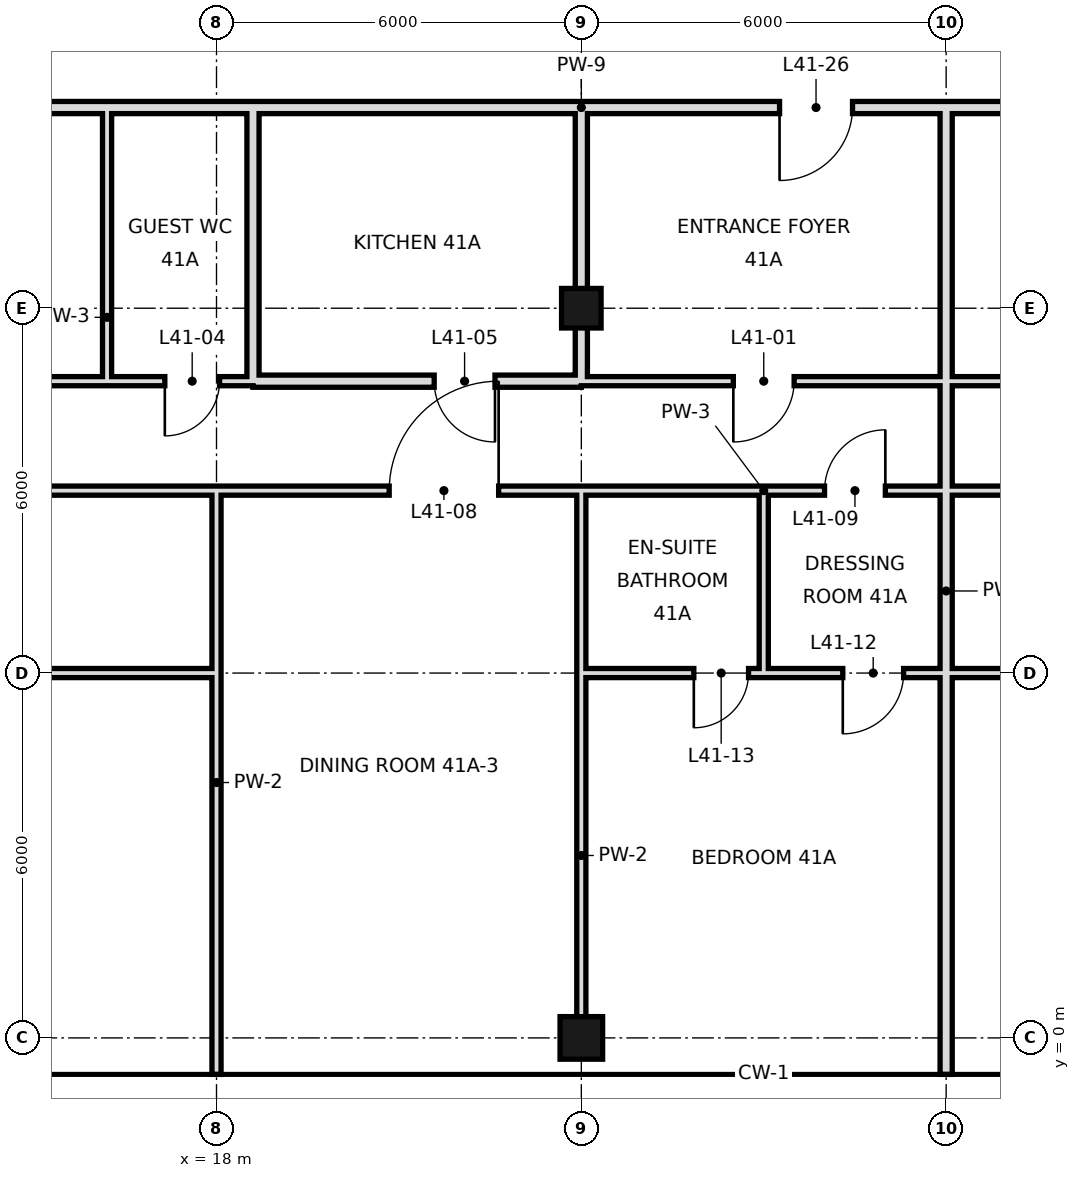
"""IFC4 building model, lengths in metres.
Left out: names, types, materials, properties, quantities, classifications, styles, units other than length and angle.
Written with IfcOpenShell. Run it as: python <this file> out.ifc"""

import sys

from ifc_helpers import new_model, si_unit, direction, frame, frame_2d, origin, origin_2d, place, context, subcontext, project, spatial, rectangle, hollow_rectangle, extrude, element, fill, save


model = new_model("IFC4")
c1 = context("Model", 3, precision=1e-05, world=origin(), true_north=direction((0.0, 1.0)))
c2 = subcontext(c1, "Body", "Model", "MODEL_VIEW")
j1 = project(units=[si_unit("LENGTHUNIT", "METRE"), si_unit("PLANEANGLEUNIT", "RADIAN")], contexts=[c1])
p1 = place(None, origin())
s1 = spatial("IfcSite", under=j1, at=p1, CompositionType="ELEMENT")
p2 = place(p1, origin())
s2 = spatial("IfcBuilding", under=s1, at=p2, CompositionType="ELEMENT")
p3 = place(p2, frame((0.0, 0.0, 178.0)))
s3 = spatial("IfcBuildingStorey", under=s2, at=p3, CompositionType="ELEMENT", Elevation=178.0)
p4 = place(p3, frame((24.0, 0.0, 0.0), z_axis=(0.0, 0.0, 1.0), x_axis=(1.0, 0.0, 0.0)))
e1 = element("IfcColumn", 1, at=p4, inside=s3, PredefinedType="COLUMN", context=c2, shape_type="SweptSolid", body=[
    extrude(hollow_rectangle(XDim=0.7, YDim=0.7, WallThickness=0.036, at=origin_2d()), origin(), (0.0, 0.0, 1.0), 3.6),
])
p5 = place(p3, frame((24.0, 12.0, 0.0), z_axis=(0.0, 0.0, 1.0), x_axis=(1.0, 0.0, 0.0)))
e2 = element("IfcColumn", 2, at=p5, inside=s3, PredefinedType="COLUMN", context=c2, shape_type="SweptSolid", body=[
    extrude(hollow_rectangle(XDim=0.65, YDim=0.65, WallThickness=0.032, at=origin_2d()), origin(), (0.0, 0.0, 1.0), 3.6),
])
p6 = place(p3, frame((16.2, 10.8, 0.0), z_axis=(0.0, 0.0, 1.0), x_axis=(0.0, 1.0, 0.0)))
e3 = element("IfcWall", 3, at=p6, inside=s3, PredefinedType="PARTITIONING", context=c2, shape_type="SweptSolid", body=[
    extrude(rectangle(XDim=4.5, YDim=0.15, at=frame_2d((2.25, 0.0))), origin(), (0.0, 0.0, 1.0), 3.42),
])
p7 = place(p3, frame((18.0, -0.6, 0.0), z_axis=(0.0, 0.0, 1.0), x_axis=(0.0, 1.0, 0.0)))
e4 = element("IfcWall", 4, at=p7, inside=s3, PredefinedType="PARTITIONING", context=c2, shape_type="SweptSolid", body=[
    extrude(rectangle(XDim=9.6, YDim=0.15, at=frame_2d((4.8, 0.0))), origin(), (0.0, 0.0, 1.0), 2.72),
])
for number, where, z_axis, x_axis in (
    (5, (18.6, 10.8, 0.0), (0.0, 0.0, 1.0), (0.0, 1.0, 0.0)),
    (6, (24.0, 10.8, 0.0), (0.0, 0.0, 1.0), (0.0, 1.0, 0.0)),
):
    element("IfcWall", number, at=place(p3, frame(where, z_axis=z_axis, x_axis=x_axis)), inside=s3, PredefinedType="SOLIDWALL", context=c2, shape_type="SweptSolid", body=[
        extrude(rectangle(XDim=4.5, YDim=0.2, at=frame_2d((2.25, 0.0))), origin(), (0.0, 0.0, 1.0), 2.72),
    ])
p8 = place(p3, frame((24.0, 0.0, 0.0), z_axis=(0.0, 0.0, 1.0), x_axis=(0.0, 1.0, 0.0)))
e7 = element("IfcWall", 7, at=p8, inside=s3, PredefinedType="PARTITIONING", context=c2, shape_type="SweptSolid", body=[
    extrude(rectangle(XDim=6.0, YDim=0.15, at=frame_2d((3.0, 0.0))), origin(), (0.0, 0.0, 1.0), 2.72),
])
p9 = place(p3, frame((24.0, 6.0, 0.0), z_axis=(0.0, 0.0, 1.0), x_axis=(0.0, 1.0, 0.0)))
e8 = element("IfcWall", 8, at=p9, inside=s3, PredefinedType="PARTITIONING", context=c2, shape_type="SweptSolid", body=[
    extrude(rectangle(XDim=3.0, YDim=0.15, at=frame_2d((1.5, 0.0))), origin(), (0.0, 0.0, 1.0), 2.72),
])
p10 = place(p3, frame((27.0, 6.0, 0.0), z_axis=(0.0, 0.0, 1.0), x_axis=(0.0, 1.0, 0.0)))
e9 = element("IfcWall", 9, at=p10, inside=s3, PredefinedType="PARTITIONING", context=c2, shape_type="SweptSolid", body=[
    extrude(rectangle(XDim=3.0, YDim=0.15, at=frame_2d((1.5, 0.0))), origin(), (0.0, 0.0, 1.0), 3.42),
])
p11 = place(p3, frame((30.0, -0.6, 0.0), z_axis=(0.0, 0.0, 1.0), x_axis=(0.0, 1.0, 0.0)))
e10 = element("IfcWall", 10, at=p11, inside=s3, PredefinedType="SOLIDWALL", context=c2, shape_type="SweptSolid", body=[
    extrude(rectangle(XDim=15.9, YDim=0.2, at=frame_2d((7.95, 0.0))), origin(), (0.0, 0.0, 1.0), 2.72),
])
p12 = place(p3, frame((18.6, 10.8, 0.0), z_axis=(0.0, 0.0, 1.0), x_axis=(1.0, 0.0, 0.0)))
e11 = element("IfcWall", 11, at=p12, inside=s3, PredefinedType="SOLIDWALL", context=c2, shape_type="SweptSolid", body=[
    extrude(rectangle(XDim=5.4, YDim=0.2, at=frame_2d((2.7, 0.0))), origin(), (0.0, 0.0, 1.0), 2.72),
])
p13 = place(p12, frame((2.98, 0.0, 0.0)))
e12 = element("IfcOpeningElement", 12, at=p13, cuts=e11, PredefinedType="OPENING", context=c2, shape_type="SweptSolid", body=[
    extrude(rectangle(XDim=1.0, YDim=2.4, at=frame_2d((0.5, 1.2))), frame((0.0, 0.11, 0.0), z_axis=(0.0, -1.0, 0.0), x_axis=(1.0, 0.0, 0.0)), (0.0, 0.0, 1.0), 0.22),
])
p14 = place(p3, frame((-6.6, 10.8, 0.0), z_axis=(0.0, 0.0, 1.0), x_axis=(1.0, 0.0, 0.0)))
e13 = element("IfcWall", 13, at=p14, inside=s3, PredefinedType="PARTITIONING", context=c2, shape_type="SweptSolid", body=[
    extrude(rectangle(XDim=22.8, YDim=0.15, at=frame_2d((11.4, 0.0))), origin(), (0.0, 0.0, 1.0), 3.42),
])
p15 = place(p14, frame((6.94, 0.0, 0.0)))
e14 = element("IfcOpeningElement", 14, at=p15, cuts=e13, PredefinedType="OPENING", context=c2, shape_type="SweptSolid", body=[
    extrude(rectangle(XDim=1.0, YDim=2.4, at=frame_2d((0.5, 1.2))), frame((0.0, 0.085, 0.0), z_axis=(0.0, -1.0, 0.0), x_axis=(1.0, 0.0, 0.0)), (0.0, 0.0, 1.0), 0.17),
])
p16 = place(p14, frame((14.2, 0.0, 0.0)))
e15 = element("IfcOpeningElement", 15, at=p16, cuts=e13, PredefinedType="OPENING", context=c2, shape_type="SweptSolid", body=[
    extrude(rectangle(XDim=1.0, YDim=2.4, at=frame_2d((0.5, 1.2))), frame((0.0, 0.085, 0.0), z_axis=(0.0, -1.0, 0.0), x_axis=(1.0, 0.0, 0.0)), (0.0, 0.0, 1.0), 0.17),
])
p17 = place(p3, frame((24.0, 10.8, 0.0), z_axis=(0.0, 0.0, 1.0), x_axis=(1.0, 0.0, 0.0)))
e16 = element("IfcWall", 16, at=p17, inside=s3, PredefinedType="PARTITIONING", context=c2, shape_type="SweptSolid", body=[
    extrude(rectangle(XDim=19.8, YDim=0.15, at=frame_2d((9.9, 0.0))), origin(), (0.0, 0.0, 1.0), 3.42),
])
p18 = place(p17, frame((2.5, 0.0, 0.0)))
e17 = element("IfcOpeningElement", 17, at=p18, cuts=e16, PredefinedType="OPENING", context=c2, shape_type="SweptSolid", body=[
    extrude(rectangle(XDim=1.0, YDim=2.4, at=frame_2d((0.5, 1.2))), frame((0.0, 0.085, 0.0), z_axis=(0.0, -1.0, 0.0), x_axis=(1.0, 0.0, 0.0)), (0.0, 0.0, 1.0), 0.17),
])
p19 = place(p17, frame((8.56, 0.0, 0.0)))
e18 = element("IfcOpeningElement", 18, at=p19, cuts=e16, PredefinedType="OPENING", context=c2, shape_type="SweptSolid", body=[
    extrude(rectangle(XDim=1.0, YDim=2.4, at=frame_2d((0.5, 1.2))), frame((0.0, 0.085, 0.0), z_axis=(0.0, -1.0, 0.0), x_axis=(1.0, 0.0, 0.0)), (0.0, 0.0, 1.0), 0.17),
])
p20 = place(p17, frame((16.3, 0.0, 0.0)))
e19 = element("IfcOpeningElement", 19, at=p20, cuts=e16, PredefinedType="OPENING", context=c2, shape_type="SweptSolid", body=[
    extrude(rectangle(XDim=1.0, YDim=2.4, at=frame_2d((0.5, 1.2))), frame((0.0, 0.085, 0.0), z_axis=(0.0, -1.0, 0.0), x_axis=(1.0, 0.0, 0.0)), (0.0, 0.0, 1.0), 0.17),
])
p21 = place(p3, frame((16.2, 10.8, 0.0), z_axis=(0.0, 0.0, 1.0), x_axis=(1.0, 0.0, 0.0)))
e20 = element("IfcWall", 20, at=p21, inside=s3, PredefinedType="PARTITIONING", context=c2, shape_type="SweptSolid", body=[
    extrude(rectangle(XDim=2.4, YDim=0.15, at=frame_2d((1.2, 0.0))), origin(), (0.0, 0.0, 1.0), 3.42),
])
p22 = place(p21, frame((0.95, 0.0, 0.0)))
e21 = element("IfcOpeningElement", 21, at=p22, cuts=e20, PredefinedType="OPENING", context=c2, shape_type="SweptSolid", body=[
    extrude(rectangle(XDim=0.9, YDim=2.4, at=frame_2d((0.45, 1.2))), frame((0.0, 0.085, 0.0), z_axis=(0.0, -1.0, 0.0), x_axis=(1.0, 0.0, 0.0)), (0.0, 0.0, 1.0), 0.17),
])
p23 = place(p3, frame((3.1, 15.3, 0.0), z_axis=(0.0, 0.0, 1.0), x_axis=(1.0, 0.0, 0.0)))
e22 = element("IfcWall", 22, at=p23, inside=s3, PredefinedType="SOLIDWALL", context=c2, shape_type="SweptSolid", body=[
    extrude(rectangle(XDim=15.5, YDim=0.2, at=frame_2d((7.75, 0.0))), origin(), (0.0, 0.0, 1.0), 2.72),
])
p24 = place(p3, frame((24.0, 15.3, 0.0), z_axis=(0.0, 0.0, 1.0), x_axis=(1.0, 0.0, 0.0)))
e23 = element("IfcWall", 23, at=p24, inside=s3, PredefinedType="SOLIDWALL", context=c2, shape_type="SweptSolid", body=[
    extrude(rectangle(XDim=20.9, YDim=0.2, at=frame_2d((10.45, 0.0))), origin(), (0.0, 0.0, 1.0), 2.72),
])
p25 = place(p24, frame((3.26, 0.0, 0.0)))
e24 = element("IfcOpeningElement", 24, at=p25, cuts=e23, PredefinedType="OPENING", context=c2, shape_type="SweptSolid", body=[
    extrude(rectangle(XDim=1.2, YDim=2.4, at=frame_2d((0.6, 1.2))), frame((0.0, 0.11, 0.0), z_axis=(0.0, -1.0, 0.0), x_axis=(1.0, 0.0, 0.0)), (0.0, 0.0, 1.0), 0.22),
])
p26 = place(p24, frame((7.18, 0.0, 0.0)))
e25 = element("IfcOpeningElement", 25, at=p26, cuts=e23, PredefinedType="OPENING", context=c2, shape_type="SweptSolid", body=[
    extrude(rectangle(XDim=1.2, YDim=2.4, at=frame_2d((0.6, 1.2))), frame((0.0, 0.11, 0.0), z_axis=(0.0, -1.0, 0.0), x_axis=(1.0, 0.0, 0.0)), (0.0, 0.0, 1.0), 0.22),
])
p27 = place(p3, frame((18.6, 15.3, 0.0), z_axis=(0.0, 0.0, 1.0), x_axis=(1.0, 0.0, 0.0)))
e26 = element("IfcWall", 26, at=p27, inside=s3, PredefinedType="SOLIDWALL", context=c2, shape_type="SweptSolid", body=[
    extrude(rectangle(XDim=5.4, YDim=0.2, at=frame_2d((2.7, 0.0))), origin(), (0.0, 0.0, 1.0), 3.42),
])
p28 = place(p3, frame((-6.0, 6.0, 0.0), z_axis=(0.0, 0.0, 1.0), x_axis=(1.0, 0.0, 0.0)))
e27 = element("IfcWall", 27, at=p28, inside=s3, PredefinedType="PARTITIONING", context=c2, shape_type="SweptSolid", body=[
    extrude(rectangle(XDim=24.0, YDim=0.15, at=frame_2d((12.0, 0.0))), origin(), (0.0, 0.0, 1.0), 2.97),
])
p29 = place(p28, frame((5.1, 0.0, 0.0)))
e28 = element("IfcOpeningElement", 28, at=p29, cuts=e27, PredefinedType="OPENING", context=c2, shape_type="SweptSolid", body=[
    extrude(rectangle(XDim=1.8, YDim=2.4, at=frame_2d((0.9, 1.2))), frame((0.0, 0.085, 0.0), z_axis=(0.0, -1.0, 0.0), x_axis=(1.0, 0.0, 0.0)), (0.0, 0.0, 1.0), 0.17),
])
p30 = place(p28, frame((19.04, 0.0, 0.0)))
e29 = element("IfcOpeningElement", 29, at=p30, cuts=e27, PredefinedType="OPENING", context=c2, shape_type="SweptSolid", body=[
    extrude(rectangle(XDim=1.8, YDim=2.4, at=frame_2d((0.9, 1.2))), frame((0.0, 0.085, 0.0), z_axis=(0.0, -1.0, 0.0), x_axis=(1.0, 0.0, 0.0)), (0.0, 0.0, 1.0), 0.17),
])
p31 = place(p3, frame((27.0, 6.0, 0.0), z_axis=(0.0, 0.0, 1.0), x_axis=(1.0, 0.0, 0.0)))
e30 = element("IfcWall", 30, at=p31, inside=s3, PredefinedType="PARTITIONING", context=c2, shape_type="SweptSolid", body=[
    extrude(rectangle(XDim=15.0, YDim=0.15, at=frame_2d((7.5, 0.0))), origin(), (0.0, 0.0, 1.0), 2.97),
])
p32 = place(p31, frame((1.3, 0.0, 0.0)))
e31 = element("IfcOpeningElement", 31, at=p32, cuts=e30, PredefinedType="OPENING", context=c2, shape_type="SweptSolid", body=[
    extrude(rectangle(XDim=1.0, YDim=2.4, at=frame_2d((0.5, 1.2))), frame((0.0, 0.085, 0.0), z_axis=(0.0, -1.0, 0.0), x_axis=(1.0, 0.0, 0.0)), (0.0, 0.0, 1.0), 0.17),
])
p33 = place(p31, frame((8.1, 0.0, 0.0)))
e32 = element("IfcOpeningElement", 32, at=p33, cuts=e30, PredefinedType="OPENING", context=c2, shape_type="SweptSolid", body=[
    extrude(rectangle(XDim=1.8, YDim=2.4, at=frame_2d((0.9, 1.2))), frame((0.0, 0.085, 0.0), z_axis=(0.0, -1.0, 0.0), x_axis=(1.0, 0.0, 0.0)), (0.0, 0.0, 1.0), 0.17),
])
p34 = place(p3, frame((24.0, 6.0, 0.0), z_axis=(0.0, 0.0, 1.0), x_axis=(1.0, 0.0, 0.0)))
e33 = element("IfcWall", 33, at=p34, inside=s3, PredefinedType="PARTITIONING", context=c2, shape_type="SweptSolid", body=[
    extrude(rectangle(XDim=3.0, YDim=0.15, at=frame_2d((1.5, 0.0))), origin(), (0.0, 0.0, 1.0), 2.97),
])
p35 = place(p34, frame((1.85, 0.0, 0.0)))
e34 = element("IfcOpeningElement", 34, at=p35, cuts=e33, PredefinedType="OPENING", context=c2, shape_type="SweptSolid", body=[
    extrude(rectangle(XDim=0.9, YDim=2.4, at=frame_2d((0.45, 1.2))), frame((0.0, 0.085, 0.0), z_axis=(0.0, -1.0, 0.0), x_axis=(1.0, 0.0, 0.0)), (0.0, 0.0, 1.0), 0.17),
])
p36 = place(p3, frame((-6.6, 9.0, 0.0), z_axis=(0.0, 0.0, 1.0), x_axis=(1.0, 0.0, 0.0)))
e35 = element("IfcWall", 35, at=p36, inside=s3, PredefinedType="PARTITIONING", context=c2, shape_type="SweptSolid", body=[
    extrude(rectangle(XDim=30.6, YDim=0.15, at=frame_2d((15.3, 0.0))), origin(), (0.0, 0.0, 1.0), 3.42),
])
p37 = place(p36, frame((7.64, 0.0, 0.0)))
e36 = element("IfcOpeningElement", 36, at=p37, cuts=e35, PredefinedType="OPENING", context=c2, shape_type="SweptSolid", body=[
    extrude(rectangle(XDim=1.8, YDim=2.4, at=frame_2d((0.9, 1.2))), frame((0.0, 0.085, 0.0), z_axis=(0.0, -1.0, 0.0), x_axis=(1.0, 0.0, 0.0)), (0.0, 0.0, 1.0), 0.17),
])
p38 = place(p36, frame((15.76, 0.0, 0.0)))
e37 = element("IfcOpeningElement", 37, at=p38, cuts=e35, PredefinedType="OPENING", context=c2, shape_type="SweptSolid", body=[
    extrude(rectangle(XDim=1.8, YDim=2.4, at=frame_2d((0.9, 1.2))), frame((0.0, 0.085, 0.0), z_axis=(0.0, -1.0, 0.0), x_axis=(1.0, 0.0, 0.0)), (0.0, 0.0, 1.0), 0.17),
])
p39 = place(p36, frame((27.44, 0.0, 0.0)))
e38 = element("IfcOpeningElement", 38, at=p39, cuts=e35, PredefinedType="OPENING", context=c2, shape_type="SweptSolid", body=[
    extrude(rectangle(XDim=1.8, YDim=2.4, at=frame_2d((0.9, 1.2))), frame((0.0, 0.085, 0.0), z_axis=(0.0, -1.0, 0.0), x_axis=(1.0, 0.0, 0.0)), (0.0, 0.0, 1.0), 0.17),
])
p40 = place(p3, frame((27.0, 9.0, 0.0), z_axis=(0.0, 0.0, 1.0), x_axis=(1.0, 0.0, 0.0)))
e39 = element("IfcWall", 39, at=p40, inside=s3, PredefinedType="PARTITIONING", context=c2, shape_type="SweptSolid", body=[
    extrude(rectangle(XDim=15.0, YDim=0.15, at=frame_2d((7.5, 0.0))), origin(), (0.0, 0.0, 1.0), 3.42),
])
p41 = place(p40, frame((1.0, 0.0, 0.0)))
e40 = element("IfcOpeningElement", 40, at=p41, cuts=e39, PredefinedType="OPENING", context=c2, shape_type="SweptSolid", body=[
    extrude(rectangle(XDim=1.0, YDim=2.4, at=frame_2d((0.5, 1.2))), frame((0.0, 0.085, 0.0), z_axis=(0.0, -1.0, 0.0), x_axis=(1.0, 0.0, 0.0)), (0.0, 0.0, 1.0), 0.17),
])
p42 = place(p40, frame((6.16, 0.0, 0.0)))
e41 = element("IfcOpeningElement", 41, at=p42, cuts=e39, PredefinedType="OPENING", context=c2, shape_type="SweptSolid", body=[
    extrude(rectangle(XDim=1.8, YDim=2.4, at=frame_2d((0.9, 1.2))), frame((0.0, 0.085, 0.0), z_axis=(0.0, -1.0, 0.0), x_axis=(1.0, 0.0, 0.0)), (0.0, 0.0, 1.0), 0.17),
])
p43 = place(p3, frame((24.0, 9.0, 0.0), z_axis=(0.0, 0.0, 1.0), x_axis=(1.0, 0.0, 0.0)))
e42 = element("IfcWall", 42, at=p43, inside=s3, PredefinedType="PARTITIONING", context=c2, shape_type="SweptSolid", body=[
    extrude(rectangle(XDim=3.0, YDim=0.15, at=frame_2d((1.5, 0.0))), origin(), (0.0, 0.0, 1.0), 3.42),
])
p44 = place(p18, frame((1.0, 0.0, 0.0), z_axis=(0.0, 0.0, 1.0), x_axis=(-1.0, 0.0, 0.0)))
e43 = element("IfcDoor", 43, at=p44, inside=s3, OperationType="SINGLE_SWING_RIGHT", PredefinedType="DOOR", context=c2, shape_type="SweptSolid", body=[
    extrude(rectangle(XDim=1.0, YDim=2.4, at=frame_2d((0.5, 1.2))), frame((0.0, 0.025, 0.0), z_axis=(0.0, -1.0, 0.0), x_axis=(1.0, 0.0, 0.0)), (0.0, 0.0, 1.0), 0.05),
])
fill(e17, e43)
p45 = place(p22, frame((0.9, 0.0, 0.0), z_axis=(0.0, 0.0, 1.0), x_axis=(-1.0, 0.0, 0.0)))
e44 = element("IfcDoor", 44, at=p45, inside=s3, OperationType="SINGLE_SWING_RIGHT", PredefinedType="DOOR", context=c2, shape_type="SweptSolid", body=[
    extrude(rectangle(XDim=0.9, YDim=2.4, at=frame_2d((0.45, 1.2))), frame((0.0, 0.025, 0.0), z_axis=(0.0, -1.0, 0.0), x_axis=(1.0, 0.0, 0.0)), (0.0, 0.0, 1.0), 0.05),
])
fill(e21, e44)
p46 = place(p13, origin())
e45 = element("IfcDoor", 45, at=p46, inside=s3, OperationType="SINGLE_SWING_RIGHT", PredefinedType="DOOR", context=c2, shape_type="SweptSolid", body=[
    extrude(rectangle(XDim=1.0, YDim=2.4, at=frame_2d((0.5, 1.2))), frame((0.0, 0.025, 0.0), z_axis=(0.0, -1.0, 0.0), x_axis=(1.0, 0.0, 0.0)), (0.0, 0.0, 1.0), 0.05),
])
fill(e12, e45)
p47 = place(p39, frame((1.8, 0.0, 0.0), z_axis=(0.0, 0.0, 1.0), x_axis=(-1.0, 0.0, 0.0)))
e46 = element("IfcDoor", 46, at=p47, inside=s3, OperationType="SINGLE_SWING_LEFT", PredefinedType="DOOR", context=c2, shape_type="SweptSolid", body=[
    extrude(rectangle(XDim=1.8, YDim=2.4, at=frame_2d((0.9, 1.2))), frame((0.0, 0.025, 0.0), z_axis=(0.0, -1.0, 0.0), x_axis=(1.0, 0.0, 0.0)), (0.0, 0.0, 1.0), 0.05),
])
fill(e38, e46)
p48 = place(p41, frame((1.0, 0.0, 0.0), z_axis=(0.0, 0.0, 1.0), x_axis=(-1.0, 0.0, 0.0)))
e47 = element("IfcDoor", 47, at=p48, inside=s3, OperationType="SINGLE_SWING_LEFT", PredefinedType="DOOR", context=c2, shape_type="SweptSolid", body=[
    extrude(rectangle(XDim=1.0, YDim=2.4, at=frame_2d((0.5, 1.2))), frame((0.0, 0.025, 0.0), z_axis=(0.0, -1.0, 0.0), x_axis=(1.0, 0.0, 0.0)), (0.0, 0.0, 1.0), 0.05),
])
fill(e40, e47)
p49 = place(p32, frame((1.0, 0.0, 0.0), z_axis=(0.0, 0.0, 1.0), x_axis=(-1.0, 0.0, 0.0)))
e48 = element("IfcDoor", 48, at=p49, inside=s3, OperationType="SINGLE_SWING_RIGHT", PredefinedType="DOOR", context=c2, shape_type="SweptSolid", body=[
    extrude(rectangle(XDim=1.0, YDim=2.4, at=frame_2d((0.5, 1.2))), frame((0.0, 0.025, 0.0), z_axis=(0.0, -1.0, 0.0), x_axis=(1.0, 0.0, 0.0)), (0.0, 0.0, 1.0), 0.05),
])
fill(e31, e48)
p50 = place(p35, frame((0.9, 0.0, 0.0), z_axis=(0.0, 0.0, 1.0), x_axis=(-1.0, 0.0, 0.0)))
e49 = element("IfcDoor", 49, at=p50, inside=s3, OperationType="SINGLE_SWING_RIGHT", PredefinedType="DOOR", context=c2, shape_type="SweptSolid", body=[
    extrude(rectangle(XDim=0.9, YDim=2.4, at=frame_2d((0.45, 1.2))), frame((0.0, 0.025, 0.0), z_axis=(0.0, -1.0, 0.0), x_axis=(1.0, 0.0, 0.0)), (0.0, 0.0, 1.0), 0.05),
])
fill(e34, e49)
p51 = place(p25, frame((1.2, 0.0, 0.0), z_axis=(0.0, 0.0, 1.0), x_axis=(-1.0, 0.0, 0.0)))
e50 = element("IfcDoor", 50, at=p51, inside=s3, OperationType="SINGLE_SWING_RIGHT", PredefinedType="DOOR", context=c2, shape_type="SweptSolid", body=[
    extrude(rectangle(XDim=1.2, YDim=2.4, at=frame_2d((0.6, 1.2))), frame((0.0, 0.025, 0.0), z_axis=(0.0, -1.0, 0.0), x_axis=(1.0, 0.0, 0.0)), (0.0, 0.0, 1.0), 0.05),
])
fill(e24, e50)
save(model, sys.argv[1])
